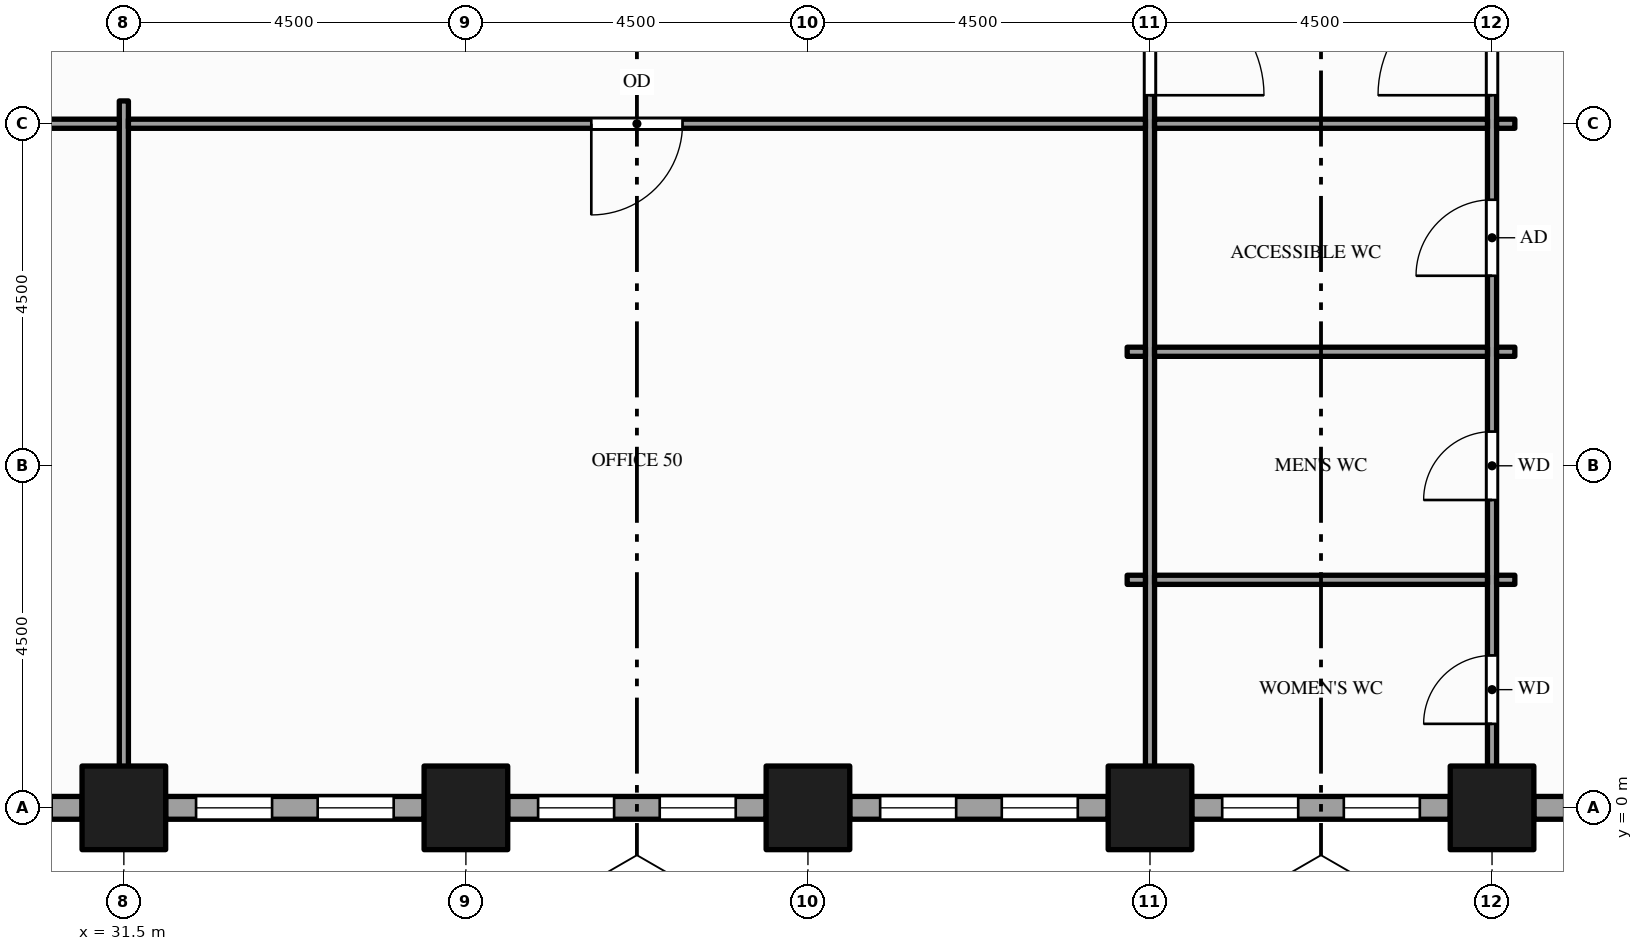
"""IFC4 building model, lengths in metres.
Left out: names, types, materials, properties, quantities, classifications, styles, units other than length and angle.
Written with IfcOpenShell. Run it as: python <this file> out.ifc"""

import sys

from ifc_helpers import new_model, si_unit, direction, frame, frame_2d, origin, origin_2d, place, context, subcontext, project, spatial, rectangle, hollow_rectangle, extrude, element, fill, save


model = new_model("IFC4")
c1 = context("Model", 3, precision=1e-05, world=origin(), true_north=direction((0.0, 1.0)))
c2 = subcontext(c1, "Body", "Model", "MODEL_VIEW")
j1 = project(units=[si_unit("LENGTHUNIT", "METRE"), si_unit("PLANEANGLEUNIT", "RADIAN")], contexts=[c1])
p1 = place(None, origin())
s1 = spatial("IfcSite", under=j1, at=p1, CompositionType="ELEMENT")
p2 = place(p1, origin())
s2 = spatial("IfcBuilding", under=s1, at=p2, CompositionType="ELEMENT")
p3 = place(p2, frame((0.0, 0.0, 24.0)))
s3 = spatial("IfcBuildingStorey", under=s2, at=p3, CompositionType="ELEMENT", Elevation=24.0)
for number, where, z_axis, x_axis in (
    (1, (31.5, 0.0, -0.25), (0.0, 0.0, 1.0), (1.0, 0.0, 0.0)),
    (2, (36.0, 0.0, -0.25), (0.0, 0.0, 1.0), (1.0, 0.0, 0.0)),
    (3, (40.5, 0.0, -0.25), (0.0, 0.0, 1.0), (1.0, 0.0, 0.0)),
    (4, (45.0, 0.0, -0.25), (0.0, 0.0, 1.0), (1.0, 0.0, 0.0)),
    (5, (49.5, 0.0, -0.25), (0.0, 0.0, 1.0), (1.0, 0.0, 0.0)),
):
    element("IfcColumn", number, at=place(p3, frame(where, z_axis=z_axis, x_axis=x_axis)), inside=s3, PredefinedType="COLUMN", context=c2, shape_type="SweptSolid", body=[
        extrude(hollow_rectangle(XDim=1.1, YDim=1.1, WallThickness=0.06, at=origin_2d()), origin(), (0.0, 0.0, 1.0), 4.95),
    ])
p4 = place(p3, frame((27.55, 0.0, 0.0), z_axis=(0.0, 0.0, 1.0), x_axis=(1.0, 0.0, 0.0)))
e6 = element("IfcWall", 6, at=p4, inside=s3, PredefinedType="STANDARD", context=c2, shape_type="SweptSolid", body=[
    extrude(rectangle(XDim=3.4, YDim=0.3, at=frame_2d((1.7, 0.0))), origin(), (0.0, 0.0, 1.0), 3.994),
])
p5 = place(p4, frame((0.4, 0.0, 0.9)))
e7 = element("IfcOpeningElement", 7, at=p5, cuts=e6, PredefinedType="OPENING", context=c2, shape_type="SweptSolid", body=[
    extrude(rectangle(XDim=1.0, YDim=2.75, at=frame_2d((0.5, 1.375))), frame((0.0, 0.16, 0.0), z_axis=(0.0, -1.0, 0.0), x_axis=(1.0, 0.0, 0.0)), (0.0, 0.0, 1.0), 0.32),
])
p6 = place(p4, frame((2.0, 0.0, 0.9)))
e8 = element("IfcOpeningElement", 8, at=p6, cuts=e6, PredefinedType="OPENING", context=c2, shape_type="SweptSolid", body=[
    extrude(rectangle(XDim=1.0, YDim=2.75, at=frame_2d((0.5, 1.375))), frame((0.0, 0.16, 0.0), z_axis=(0.0, -1.0, 0.0), x_axis=(1.0, 0.0, 0.0)), (0.0, 0.0, 1.0), 0.32),
])
p7 = place(p3, frame((32.05, 0.0, 0.0), z_axis=(0.0, 0.0, 1.0), x_axis=(1.0, 0.0, 0.0)))
e9 = element("IfcWall", 9, at=p7, inside=s3, PredefinedType="STANDARD", context=c2, shape_type="SweptSolid", body=[
    extrude(rectangle(XDim=3.4, YDim=0.3, at=frame_2d((1.7, 0.0))), origin(), (0.0, 0.0, 1.0), 3.994),
])
p8 = place(p7, frame((0.4, 0.0, 0.9)))
e10 = element("IfcOpeningElement", 10, at=p8, cuts=e9, PredefinedType="OPENING", context=c2, shape_type="SweptSolid", body=[
    extrude(rectangle(XDim=1.0, YDim=2.75, at=frame_2d((0.5, 1.375))), frame((0.0, 0.16, 0.0), z_axis=(0.0, -1.0, 0.0), x_axis=(1.0, 0.0, 0.0)), (0.0, 0.0, 1.0), 0.32),
])
p9 = place(p7, frame((2.0, 0.0, 0.9)))
e11 = element("IfcOpeningElement", 11, at=p9, cuts=e9, PredefinedType="OPENING", context=c2, shape_type="SweptSolid", body=[
    extrude(rectangle(XDim=1.0, YDim=2.75, at=frame_2d((0.5, 1.375))), frame((0.0, 0.16, 0.0), z_axis=(0.0, -1.0, 0.0), x_axis=(1.0, 0.0, 0.0)), (0.0, 0.0, 1.0), 0.32),
])
p10 = place(p3, frame((36.55, 0.0, 0.0), z_axis=(0.0, 0.0, 1.0), x_axis=(1.0, 0.0, 0.0)))
e12 = element("IfcWall", 12, at=p10, inside=s3, PredefinedType="STANDARD", context=c2, shape_type="SweptSolid", body=[
    extrude(rectangle(XDim=3.4, YDim=0.3, at=frame_2d((1.7, 0.0))), origin(), (0.0, 0.0, 1.0), 3.994),
])
p11 = place(p10, frame((0.4, 0.0, 0.9)))
e13 = element("IfcOpeningElement", 13, at=p11, cuts=e12, PredefinedType="OPENING", context=c2, shape_type="SweptSolid", body=[
    extrude(rectangle(XDim=1.0, YDim=2.75, at=frame_2d((0.5, 1.375))), frame((0.0, 0.16, 0.0), z_axis=(0.0, -1.0, 0.0), x_axis=(1.0, 0.0, 0.0)), (0.0, 0.0, 1.0), 0.32),
])
p12 = place(p10, frame((2.0, 0.0, 0.9)))
e14 = element("IfcOpeningElement", 14, at=p12, cuts=e12, PredefinedType="OPENING", context=c2, shape_type="SweptSolid", body=[
    extrude(rectangle(XDim=1.0, YDim=2.75, at=frame_2d((0.5, 1.375))), frame((0.0, 0.16, 0.0), z_axis=(0.0, -1.0, 0.0), x_axis=(1.0, 0.0, 0.0)), (0.0, 0.0, 1.0), 0.32),
])
p13 = place(p3, frame((41.05, 0.0, 0.0), z_axis=(0.0, 0.0, 1.0), x_axis=(1.0, 0.0, 0.0)))
e15 = element("IfcWall", 15, at=p13, inside=s3, PredefinedType="STANDARD", context=c2, shape_type="SweptSolid", body=[
    extrude(rectangle(XDim=3.4, YDim=0.3, at=frame_2d((1.7, 0.0))), origin(), (0.0, 0.0, 1.0), 3.994),
])
p14 = place(p13, frame((0.4, 0.0, 0.9)))
e16 = element("IfcOpeningElement", 16, at=p14, cuts=e15, PredefinedType="OPENING", context=c2, shape_type="SweptSolid", body=[
    extrude(rectangle(XDim=1.0, YDim=2.75, at=frame_2d((0.5, 1.375))), frame((0.0, 0.16, 0.0), z_axis=(0.0, -1.0, 0.0), x_axis=(1.0, 0.0, 0.0)), (0.0, 0.0, 1.0), 0.32),
])
p15 = place(p13, frame((2.0, 0.0, 0.9)))
e17 = element("IfcOpeningElement", 17, at=p15, cuts=e15, PredefinedType="OPENING", context=c2, shape_type="SweptSolid", body=[
    extrude(rectangle(XDim=1.0, YDim=2.75, at=frame_2d((0.5, 1.375))), frame((0.0, 0.16, 0.0), z_axis=(0.0, -1.0, 0.0), x_axis=(1.0, 0.0, 0.0)), (0.0, 0.0, 1.0), 0.32),
])
p16 = place(p3, frame((45.55, 0.0, 0.0), z_axis=(0.0, 0.0, 1.0), x_axis=(1.0, 0.0, 0.0)))
e18 = element("IfcWall", 18, at=p16, inside=s3, PredefinedType="STANDARD", context=c2, shape_type="SweptSolid", body=[
    extrude(rectangle(XDim=3.4, YDim=0.3, at=frame_2d((1.7, 0.0))), origin(), (0.0, 0.0, 1.0), 3.994),
])
p17 = place(p16, frame((0.4, 0.0, 0.9)))
e19 = element("IfcOpeningElement", 19, at=p17, cuts=e18, PredefinedType="OPENING", context=c2, shape_type="SweptSolid", body=[
    extrude(rectangle(XDim=1.0, YDim=2.75, at=frame_2d((0.5, 1.375))), frame((0.0, 0.16, 0.0), z_axis=(0.0, -1.0, 0.0), x_axis=(1.0, 0.0, 0.0)), (0.0, 0.0, 1.0), 0.32),
])
p18 = place(p16, frame((2.0, 0.0, 0.9)))
e20 = element("IfcOpeningElement", 20, at=p18, cuts=e18, PredefinedType="OPENING", context=c2, shape_type="SweptSolid", body=[
    extrude(rectangle(XDim=1.0, YDim=2.75, at=frame_2d((0.5, 1.375))), frame((0.0, 0.16, 0.0), z_axis=(0.0, -1.0, 0.0), x_axis=(1.0, 0.0, 0.0)), (0.0, 0.0, 1.0), 0.32),
])
p19 = place(p3, frame((50.05, 0.0, 0.0), z_axis=(0.0, 0.0, 1.0), x_axis=(1.0, 0.0, 0.0)))
e21 = element("IfcWall", 21, at=p19, inside=s3, PredefinedType="STANDARD", context=c2, shape_type="SweptSolid", body=[
    extrude(rectangle(XDim=3.949, YDim=0.3, at=frame_2d((1.975, 0.0))), origin(), (0.0, 0.0, 1.0), 3.994),
])
p20 = place(p19, frame((0.4, 0.0, 0.9)))
e22 = element("IfcOpeningElement", 22, at=p20, cuts=e21, PredefinedType="OPENING", context=c2, shape_type="SweptSolid", body=[
    extrude(rectangle(XDim=1.0, YDim=2.75, at=frame_2d((0.5, 1.375))), frame((0.0, 0.16, 0.0), z_axis=(0.0, -1.0, 0.0), x_axis=(1.0, 0.0, 0.0)), (0.0, 0.0, 1.0), 0.32),
])
p21 = place(p19, frame((2.024, 0.0, 0.9)))
e23 = element("IfcOpeningElement", 23, at=p21, cuts=e21, PredefinedType="OPENING", context=c2, shape_type="SweptSolid", body=[
    extrude(rectangle(XDim=1.5, YDim=2.75, at=frame_2d((0.75, 1.375))), frame((0.0, 0.16, 0.0), z_axis=(0.0, -1.0, 0.0), x_axis=(1.0, 0.0, 0.0)), (0.0, 0.0, 1.0), 0.32),
])
p22 = place(p3, frame((31.5, 0.15, 0.0), z_axis=(0.0, 0.0, 1.0), x_axis=(0.0, 1.0, 0.0)))
e24 = element("IfcWall", 24, at=p22, inside=s3, PredefinedType="PARTITIONING", context=c2, shape_type="SweptSolid", body=[
    extrude(rectangle(XDim=9.15, YDim=0.12, at=frame_2d((4.575, 0.0))), origin(), (0.0, 0.0, 1.0), 3.3),
])
p23 = place(p3, frame((45.0, 0.15, 0.0), z_axis=(0.0, 0.0, 1.0), x_axis=(0.0, 1.0, 0.0)))
e25 = element("IfcWall", 25, at=p23, inside=s3, PredefinedType="PARTITIONING", context=c2, shape_type="SweptSolid", body=[
    extrude(rectangle(XDim=22.65, YDim=0.12, at=frame_2d((11.325, 0.0))), origin(), (0.0, 0.0, 1.0), 3.3),
])
p24 = place(p23, frame((9.225, 0.0, 0.0)))
e26 = element("IfcOpeningElement", 26, at=p24, cuts=e25, PredefinedType="OPENING", context=c2, shape_type="SweptSolid", body=[
    extrude(rectangle(XDim=1.5, YDim=2.1, at=frame_2d((0.75, 1.05))), frame((0.0, 0.07, 0.0), z_axis=(0.0, -1.0, 0.0), x_axis=(1.0, 0.0, 0.0)), (0.0, 0.0, 1.0), 0.14),
])
p25 = place(p3, frame((49.5, 0.15, 0.0), z_axis=(0.0, 0.0, 1.0), x_axis=(0.0, 1.0, 0.0)))
e27 = element("IfcWall", 27, at=p25, inside=s3, PredefinedType="PARTITIONING", context=c2, shape_type="SweptSolid", body=[
    extrude(rectangle(XDim=22.65, YDim=0.12, at=frame_2d((11.325, 0.0))), origin(), (0.0, 0.0, 1.0), 3.3),
])
p26 = place(p25, frame((0.955, 0.0, 0.0)))
e28 = element("IfcOpeningElement", 28, at=p26, cuts=e27, PredefinedType="OPENING", context=c2, shape_type="SweptSolid", body=[
    extrude(rectangle(XDim=0.9, YDim=2.1, at=frame_2d((0.45, 1.05))), frame((0.0, 0.07, 0.0), z_axis=(0.0, -1.0, 0.0), x_axis=(1.0, 0.0, 0.0)), (0.0, 0.0, 1.0), 0.14),
])
p27 = place(p25, frame((3.9, 0.0, 0.0)))
e29 = element("IfcOpeningElement", 29, at=p27, cuts=e27, PredefinedType="OPENING", context=c2, shape_type="SweptSolid", body=[
    extrude(rectangle(XDim=0.9, YDim=2.1, at=frame_2d((0.45, 1.05))), frame((0.0, 0.07, 0.0), z_axis=(0.0, -1.0, 0.0), x_axis=(1.0, 0.0, 0.0)), (0.0, 0.0, 1.0), 0.14),
])
p28 = place(p25, frame((6.85, 0.0, 0.0)))
e30 = element("IfcOpeningElement", 30, at=p28, cuts=e27, PredefinedType="OPENING", context=c2, shape_type="SweptSolid", body=[
    extrude(rectangle(XDim=1.0, YDim=2.1, at=frame_2d((0.5, 1.05))), frame((0.0, 0.07, 0.0), z_axis=(0.0, -1.0, 0.0), x_axis=(1.0, 0.0, 0.0)), (0.0, 0.0, 1.0), 0.14),
])
p29 = place(p25, frame((16.275, 0.0, 0.0)))
e31 = element("IfcOpeningElement", 31, at=p29, cuts=e27, PredefinedType="OPENING", context=c2, shape_type="SweptSolid", body=[
    extrude(rectangle(XDim=0.9, YDim=2.1, at=frame_2d((0.45, 1.05))), frame((0.0, 0.07, 0.0), z_axis=(0.0, -1.0, 0.0), x_axis=(1.0, 0.0, 0.0)), (0.0, 0.0, 1.0), 0.14),
])
p30 = place(p25, frame((9.225, 0.0, 0.0)))
e32 = element("IfcOpeningElement", 32, at=p30, cuts=e27, PredefinedType="OPENING", context=c2, shape_type="SweptSolid", body=[
    extrude(rectangle(XDim=1.5, YDim=2.1, at=frame_2d((0.75, 1.05))), frame((0.0, 0.07, 0.0), z_axis=(0.0, -1.0, 0.0), x_axis=(1.0, 0.0, 0.0)), (0.0, 0.0, 1.0), 0.14),
])
p31 = place(p3, frame((44.7, 3.0, 0.0), z_axis=(0.0, 0.0, 1.0), x_axis=(1.0, 0.0, 0.0)))
e33 = element("IfcWall", 33, at=p31, inside=s3, PredefinedType="PARTITIONING", context=c2, shape_type="SweptSolid", body=[
    extrude(rectangle(XDim=0.24, YDim=0.12, at=frame_2d((0.12, 0.0))), origin(), (0.0, 0.0, 1.0), 3.938),
])
p32 = place(p3, frame((45.06, 3.0, 0.0), z_axis=(0.0, 0.0, 1.0), x_axis=(1.0, 0.0, 0.0)))
e34 = element("IfcWall", 34, at=p32, inside=s3, PredefinedType="PARTITIONING", context=c2, shape_type="SweptSolid", body=[
    extrude(rectangle(XDim=4.38, YDim=0.12, at=frame_2d((2.19, 0.0))), origin(), (0.0, 0.0, 1.0), 3.938),
])
for number, where, z_axis, x_axis in (
    (35, (49.56, 3.0, 0.0), (0.0, 0.0, 1.0), (1.0, 0.0, 0.0)),
    (36, (44.7, 6.0, 0.0), (0.0, 0.0, 1.0), (1.0, 0.0, 0.0)),
):
    element("IfcWall", number, at=place(p3, frame(where, z_axis=z_axis, x_axis=x_axis)), inside=s3, PredefinedType="PARTITIONING", context=c2, shape_type="SweptSolid", body=[
        extrude(rectangle(XDim=0.24, YDim=0.12, at=frame_2d((0.12, 0.0))), origin(), (0.0, 0.0, 1.0), 3.938),
    ])
p33 = place(p3, frame((45.06, 6.0, 0.0), z_axis=(0.0, 0.0, 1.0), x_axis=(1.0, 0.0, 0.0)))
e37 = element("IfcWall", 37, at=p33, inside=s3, PredefinedType="PARTITIONING", context=c2, shape_type="SweptSolid", body=[
    extrude(rectangle(XDim=4.38, YDim=0.12, at=frame_2d((2.19, 0.0))), origin(), (0.0, 0.0, 1.0), 3.938),
])
p34 = place(p3, frame((49.56, 6.0, 0.0), z_axis=(0.0, 0.0, 1.0), x_axis=(1.0, 0.0, 0.0)))
e38 = element("IfcWall", 38, at=p34, inside=s3, PredefinedType="PARTITIONING", context=c2, shape_type="SweptSolid", body=[
    extrude(rectangle(XDim=0.24, YDim=0.12, at=frame_2d((0.12, 0.0))), origin(), (0.0, 0.0, 1.0), 3.938),
])
p35 = place(p3, frame((22.56, 9.0, 0.0), z_axis=(0.0, 0.0, 1.0), x_axis=(1.0, 0.0, 0.0)))
e39 = element("IfcWall", 39, at=p35, inside=s3, PredefinedType="PARTITIONING", context=c2, shape_type="SweptSolid", body=[
    extrude(rectangle(XDim=8.88, YDim=0.12, at=frame_2d((4.44, 0.0))), origin(), (0.0, 0.0, 1.0), 3.788),
])
p36 = place(p35, frame((3.84, 0.0, 0.0)))
e40 = element("IfcOpeningElement", 40, at=p36, cuts=e39, PredefinedType="OPENING", context=c2, shape_type="SweptSolid", body=[
    extrude(rectangle(XDim=1.2, YDim=2.1, at=frame_2d((0.6, 1.05))), frame((0.0, 0.07, 0.0), z_axis=(0.0, -1.0, 0.0), x_axis=(1.0, 0.0, 0.0)), (0.0, 0.0, 1.0), 0.14),
])
p37 = place(p3, frame((31.56, 9.0, 0.0), z_axis=(0.0, 0.0, 1.0), x_axis=(1.0, 0.0, 0.0)))
e41 = element("IfcWall", 41, at=p37, inside=s3, PredefinedType="PARTITIONING", context=c2, shape_type="SweptSolid", body=[
    extrude(rectangle(XDim=13.38, YDim=0.12, at=frame_2d((6.69, 0.0))), origin(), (0.0, 0.0, 1.0), 3.938),
])
p38 = place(p37, frame((6.09, 0.0, 0.0)))
e42 = element("IfcOpeningElement", 42, at=p38, cuts=e41, PredefinedType="OPENING", context=c2, shape_type="SweptSolid", body=[
    extrude(rectangle(XDim=1.2, YDim=2.1, at=frame_2d((0.6, 1.05))), frame((0.0, 0.07, 0.0), z_axis=(0.0, -1.0, 0.0), x_axis=(1.0, 0.0, 0.0)), (0.0, 0.0, 1.0), 0.14),
])
p39 = place(p3, frame((45.06, 9.0, 0.0), z_axis=(0.0, 0.0, 1.0), x_axis=(1.0, 0.0, 0.0)))
e43 = element("IfcWall", 43, at=p39, inside=s3, PredefinedType="PARTITIONING", context=c2, shape_type="SweptSolid", body=[
    extrude(rectangle(XDim=4.38, YDim=0.12, at=frame_2d((2.19, 0.0))), origin(), (0.0, 0.0, 1.0), 3.938),
])
p40 = place(p3, frame((49.56, 9.0, 0.0), z_axis=(0.0, 0.0, 1.0), x_axis=(1.0, 0.0, 0.0)))
e44 = element("IfcWall", 44, at=p40, inside=s3, PredefinedType="PARTITIONING", context=c2, shape_type="SweptSolid", body=[
    extrude(rectangle(XDim=0.24, YDim=0.12, at=frame_2d((0.12, 0.0))), origin(), (0.0, 0.0, 1.0), 3.938),
])
p41 = place(p8, origin())
e45 = element("IfcWindow", 45, at=p41, inside=s3, PartitioningType="SINGLE_PANEL", PredefinedType="WINDOW", context=c2, shape_type="SweptSolid", body=[
    extrude(rectangle(XDim=1.0, YDim=2.75, at=frame_2d((0.5, 1.375))), frame((0.0, 0.03, 0.0), z_axis=(0.0, -1.0, 0.0), x_axis=(1.0, 0.0, 0.0)), (0.0, 0.0, 1.0), 0.06),
])
fill(e10, e45)
p42 = place(p9, origin())
e46 = element("IfcWindow", 46, at=p42, inside=s3, PartitioningType="SINGLE_PANEL", PredefinedType="WINDOW", context=c2, shape_type="SweptSolid", body=[
    extrude(rectangle(XDim=1.0, YDim=2.75, at=frame_2d((0.5, 1.375))), frame((0.0, 0.03, 0.0), z_axis=(0.0, -1.0, 0.0), x_axis=(1.0, 0.0, 0.0)), (0.0, 0.0, 1.0), 0.06),
])
fill(e11, e46)
p43 = place(p11, origin())
e47 = element("IfcWindow", 47, at=p43, inside=s3, PartitioningType="SINGLE_PANEL", PredefinedType="WINDOW", context=c2, shape_type="SweptSolid", body=[
    extrude(rectangle(XDim=1.0, YDim=2.75, at=frame_2d((0.5, 1.375))), frame((0.0, 0.03, 0.0), z_axis=(0.0, -1.0, 0.0), x_axis=(1.0, 0.0, 0.0)), (0.0, 0.0, 1.0), 0.06),
])
fill(e13, e47)
p44 = place(p12, origin())
e48 = element("IfcWindow", 48, at=p44, inside=s3, PartitioningType="SINGLE_PANEL", PredefinedType="WINDOW", context=c2, shape_type="SweptSolid", body=[
    extrude(rectangle(XDim=1.0, YDim=2.75, at=frame_2d((0.5, 1.375))), frame((0.0, 0.03, 0.0), z_axis=(0.0, -1.0, 0.0), x_axis=(1.0, 0.0, 0.0)), (0.0, 0.0, 1.0), 0.06),
])
fill(e14, e48)
p45 = place(p14, origin())
e49 = element("IfcWindow", 49, at=p45, inside=s3, PartitioningType="SINGLE_PANEL", PredefinedType="WINDOW", context=c2, shape_type="SweptSolid", body=[
    extrude(rectangle(XDim=1.0, YDim=2.75, at=frame_2d((0.5, 1.375))), frame((0.0, 0.03, 0.0), z_axis=(0.0, -1.0, 0.0), x_axis=(1.0, 0.0, 0.0)), (0.0, 0.0, 1.0), 0.06),
])
fill(e16, e49)
p46 = place(p15, origin())
e50 = element("IfcWindow", 50, at=p46, inside=s3, PartitioningType="SINGLE_PANEL", PredefinedType="WINDOW", context=c2, shape_type="SweptSolid", body=[
    extrude(rectangle(XDim=1.0, YDim=2.75, at=frame_2d((0.5, 1.375))), frame((0.0, 0.03, 0.0), z_axis=(0.0, -1.0, 0.0), x_axis=(1.0, 0.0, 0.0)), (0.0, 0.0, 1.0), 0.06),
])
fill(e17, e50)
p47 = place(p17, origin())
e51 = element("IfcWindow", 51, at=p47, inside=s3, PartitioningType="SINGLE_PANEL", PredefinedType="WINDOW", context=c2, shape_type="SweptSolid", body=[
    extrude(rectangle(XDim=1.0, YDim=2.75, at=frame_2d((0.5, 1.375))), frame((0.0, 0.03, 0.0), z_axis=(0.0, -1.0, 0.0), x_axis=(1.0, 0.0, 0.0)), (0.0, 0.0, 1.0), 0.06),
])
fill(e19, e51)
p48 = place(p18, origin())
e52 = element("IfcWindow", 52, at=p48, inside=s3, PartitioningType="SINGLE_PANEL", PredefinedType="WINDOW", context=c2, shape_type="SweptSolid", body=[
    extrude(rectangle(XDim=1.0, YDim=2.75, at=frame_2d((0.5, 1.375))), frame((0.0, 0.03, 0.0), z_axis=(0.0, -1.0, 0.0), x_axis=(1.0, 0.0, 0.0)), (0.0, 0.0, 1.0), 0.06),
])
fill(e20, e52)
p49 = place(p26, origin())
e53 = element("IfcDoor", 53, at=p49, inside=s3, OperationType="SINGLE_SWING_LEFT", PredefinedType="DOOR", context=c2, shape_type="SweptSolid", body=[
    extrude(rectangle(XDim=0.9, YDim=2.1, at=frame_2d((0.45, 1.05))), frame((0.0, 0.025, 0.0), z_axis=(0.0, -1.0, 0.0), x_axis=(1.0, 0.0, 0.0)), (0.0, 0.0, 1.0), 0.05),
])
fill(e28, e53)
p50 = place(p27, origin())
e54 = element("IfcDoor", 54, at=p50, inside=s3, OperationType="SINGLE_SWING_LEFT", PredefinedType="DOOR", context=c2, shape_type="SweptSolid", body=[
    extrude(rectangle(XDim=0.9, YDim=2.1, at=frame_2d((0.45, 1.05))), frame((0.0, 0.025, 0.0), z_axis=(0.0, -1.0, 0.0), x_axis=(1.0, 0.0, 0.0)), (0.0, 0.0, 1.0), 0.05),
])
fill(e29, e54)
p51 = place(p28, origin())
e55 = element("IfcDoor", 55, at=p51, inside=s3, OperationType="SINGLE_SWING_LEFT", PredefinedType="DOOR", context=c2, shape_type="SweptSolid", body=[
    extrude(rectangle(XDim=1.0, YDim=2.1, at=frame_2d((0.5, 1.05))), frame((0.0, 0.025, 0.0), z_axis=(0.0, -1.0, 0.0), x_axis=(1.0, 0.0, 0.0)), (0.0, 0.0, 1.0), 0.05),
])
fill(e30, e55)
p52 = place(p30, origin())
e56 = element("IfcDoor", 56, at=p52, inside=s3, OperationType="SINGLE_SWING_LEFT", PredefinedType="DOOR", context=c2, shape_type="SweptSolid", body=[
    extrude(rectangle(XDim=1.5, YDim=2.1, at=frame_2d((0.75, 1.05))), frame((0.0, 0.025, 0.0), z_axis=(0.0, -1.0, 0.0), x_axis=(1.0, 0.0, 0.0)), (0.0, 0.0, 1.0), 0.05),
])
fill(e32, e56)
p53 = place(p24, origin())
e57 = element("IfcDoor", 57, at=p53, inside=s3, OperationType="SINGLE_SWING_LEFT", PredefinedType="DOOR", context=c2, shape_type="SweptSolid", body=[
    extrude(rectangle(XDim=1.5, YDim=2.1, at=frame_2d((0.75, 1.05))), frame((0.0, 0.025, 0.0), z_axis=(0.0, -1.0, 0.0), x_axis=(1.0, 0.0, 0.0)), (0.0, 0.0, 1.0), 0.05),
])
fill(e26, e57)
p54 = place(p38, origin())
e58 = element("IfcDoor", 58, at=p54, inside=s3, OperationType="SINGLE_SWING_LEFT", PredefinedType="DOOR", context=c2, shape_type="SweptSolid", body=[
    extrude(rectangle(XDim=1.2, YDim=2.1, at=frame_2d((0.6, 1.05))), frame((0.0, 0.025, 0.0), z_axis=(0.0, -1.0, 0.0), x_axis=(1.0, 0.0, 0.0)), (0.0, 0.0, 1.0), 0.05),
])
fill(e42, e58)
save(model, sys.argv[1])
